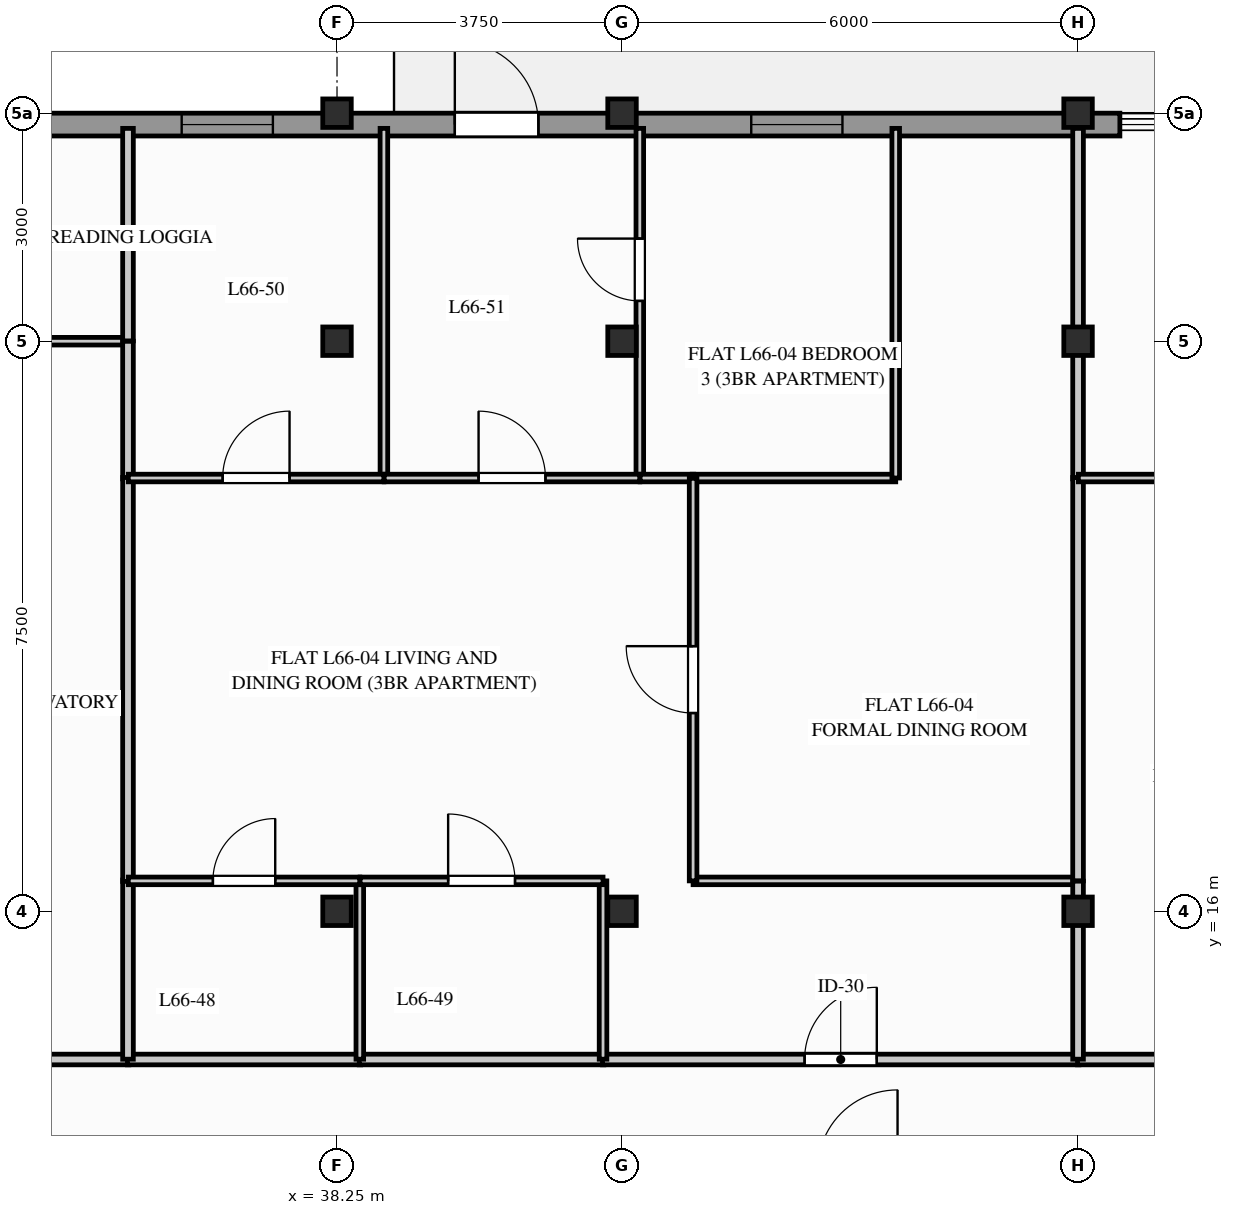
"""IFC4 building model, lengths in metres.
Left out: names, types, materials, properties, quantities, classifications, styles, units other than length and angle.
Written with IfcOpenShell. Run it as: python <this file> out.ifc"""

import sys

from ifc_helpers import new_model, si_unit, direction, frame, frame_2d, origin, origin_2d, place, context, subcontext, project, spatial, rectangle, i_section, extrude, element, fill, save


model = new_model("IFC4")
c1 = context("Model", 3, precision=1e-05, world=origin(), true_north=direction((0.0, 1.0)))
c2 = subcontext(c1, "Body", "Model", "MODEL_VIEW")
j1 = project(units=[si_unit("LENGTHUNIT", "METRE"), si_unit("PLANEANGLEUNIT", "RADIAN")], contexts=[c1])
p1 = place(None, origin())
s1 = spatial("IfcSite", under=j1, at=p1, CompositionType="ELEMENT")
p2 = place(p1, origin())
s2 = spatial("IfcBuilding", under=s1, at=p2, CompositionType="ELEMENT")
p3 = place(p2, frame((0.0, 0.0, 218.0)))
s3 = spatial("IfcBuildingStorey", under=s2, at=p3, CompositionType="ELEMENT", Elevation=218.0)
for number, where, z_axis, x_axis in (
    (1, (38.25, 16.0, 0.0), (0.0, 0.0, 1.0), (1.0, 0.0, 0.0)),
    (2, (38.25, 23.5, 0.0), (0.0, 0.0, 1.0), (1.0, 0.0, 0.0)),
    (3, (38.25, 26.5, 0.0), (0.0, 0.0, 1.0), (1.0, 0.0, 0.0)),
    (4, (42.0, 16.0, 0.0), (0.0, 0.0, 1.0), (1.0, 0.0, 0.0)),
    (5, (42.0, 23.5, 0.0), (0.0, 0.0, 1.0), (1.0, 0.0, 0.0)),
    (6, (42.0, 26.5, 0.0), (0.0, 0.0, 1.0), (1.0, 0.0, 0.0)),
    (7, (48.0, 16.0, 0.0), (0.0, 0.0, 1.0), (1.0, 0.0, 0.0)),
    (8, (48.0, 23.5, 0.0), (0.0, 0.0, 1.0), (1.0, 0.0, 0.0)),
    (9, (48.0, 26.5, 0.0), (0.0, 0.0, 1.0), (1.0, 0.0, 0.0)),
):
    element("IfcColumn", number, at=place(p3, frame(where, z_axis=z_axis, x_axis=x_axis)), inside=s3, PredefinedType="COLUMN", context=c2, shape_type="SweptSolid", body=[
        extrude(i_section(OverallWidth=0.375, OverallDepth=0.375, WebThickness=0.017, FlangeThickness=0.027, FilletRadius=0.015, at=origin_2d()), origin(), (0.0, 0.0, 1.0), 3.1),
    ])
p4 = place(p3, frame((32.2, 26.35, 0.0), z_axis=(0.0, 0.0, 1.0), x_axis=(1.0, 0.0, 0.0)))
e10 = element("IfcWall", 10, at=p4, inside=s3, PredefinedType="STANDARD", context=c2, shape_type="SweptSolid", body=[
    extrude(rectangle(XDim=16.35, YDim=0.3, at=frame_2d((8.175, 0.0))), origin(), (0.0, 0.0, 1.0), 2.332),
])
p5 = place(p4, frame((7.6, 0.0, 0.0)))
e11 = element("IfcOpeningElement", 11, at=p5, cuts=e10, PredefinedType="OPENING", context=c2, shape_type="SweptSolid", body=[
    extrude(rectangle(XDim=1.1, YDim=2.2, at=frame_2d((0.55, 1.1))), frame((0.0, 0.16, 0.0), z_axis=(0.0, -1.0, 0.0), x_axis=(1.0, 0.0, 0.0)), (0.0, 0.0, 1.0), 0.32),
])
p6 = place(p4, frame((11.5, 0.0, 0.512)))
e12 = element("IfcOpeningElement", 12, at=p6, cuts=e10, PredefinedType="OPENING", context=c2, shape_type="SweptSolid", body=[
    extrude(rectangle(XDim=1.2, YDim=1.6, at=frame_2d((0.6, 0.8))), frame((0.0, 0.16, 0.0), z_axis=(0.0, -1.0, 0.0), x_axis=(1.0, 0.0, 0.0)), (0.0, 0.0, 1.0), 0.32),
])
p7 = place(p4, frame((4.006, 0.0, 0.512)))
e13 = element("IfcOpeningElement", 13, at=p7, cuts=e10, PredefinedType="OPENING", context=c2, shape_type="SweptSolid", body=[
    extrude(rectangle(XDim=1.2, YDim=1.6, at=frame_2d((0.6, 0.8))), frame((0.0, 0.16, 0.0), z_axis=(0.0, -1.0, 0.0), x_axis=(1.0, 0.0, 0.0)), (0.0, 0.0, 1.0), 0.32),
])
p8 = place(p3, frame((24.493, 14.05, 0.0), z_axis=(0.0, 0.0, 1.0), x_axis=(1.0, 0.0, 0.0)))
e14 = element("IfcWall", 14, at=p8, inside=s3, PredefinedType="PARTITIONING", context=c2, shape_type="SweptSolid", body=[
    extrude(rectangle(XDim=11.019, YDim=0.14, at=frame_2d((5.509, 0.0))), origin(), (0.0, 0.0, 1.0), 2.332),
])
p9 = place(p8, frame((4.984, 0.0, 0.0)))
e15 = element("IfcOpeningElement", 15, at=p9, cuts=e14, PredefinedType="OPENING", context=c2, shape_type="SweptSolid", body=[
    extrude(rectangle(XDim=1.05, YDim=2.06, at=frame_2d((0.525, 1.03))), frame((0.0, 0.08, 0.0), z_axis=(0.0, -1.0, 0.0), x_axis=(1.0, 0.0, 0.0)), (0.0, 0.0, 1.0), 0.16),
])
p10 = place(p3, frame((35.493, 14.05, 0.0), z_axis=(0.0, 0.0, 1.0), x_axis=(1.0, 0.0, 0.0)))
e16 = element("IfcWall", 16, at=p10, inside=s3, PredefinedType="PARTITIONING", context=c2, shape_type="SweptSolid", body=[
    extrude(rectangle(XDim=3.069, YDim=0.14, at=frame_2d((1.534, 0.0))), origin(), (0.0, 0.0, 1.0), 2.325),
])
p11 = place(p3, frame((38.543, 14.05, 0.0), z_axis=(0.0, 0.0, 1.0), x_axis=(1.0, 0.0, 0.0)))
e17 = element("IfcWall", 17, at=p11, inside=s3, PredefinedType="PARTITIONING", context=c2, shape_type="SweptSolid", body=[
    extrude(rectangle(XDim=3.219, YDim=0.14, at=frame_2d((1.609, 0.0))), origin(), (0.0, 0.0, 1.0), 2.89),
])
p12 = place(p3, frame((41.743, 14.05, 0.0), z_axis=(0.0, 0.0, 1.0), x_axis=(1.0, 0.0, 0.0)))
e18 = element("IfcWall", 18, at=p12, inside=s3, PredefinedType="PARTITIONING", context=c2, shape_type="SweptSolid", body=[
    extrude(rectangle(XDim=6.269, YDim=0.14, at=frame_2d((3.134, 0.0))), origin(), (0.0, 0.0, 1.0), 2.325),
])
p13 = place(p12, frame((2.659, 0.0, 0.0)))
e19 = element("IfcOpeningElement", 19, at=p13, cuts=e18, PredefinedType="OPENING", context=c2, shape_type="SweptSolid", body=[
    extrude(rectangle(XDim=0.95, YDim=2.05, at=frame_2d((0.475, 1.025))), frame((0.0, 0.08, 0.0), z_axis=(0.0, -1.0, 0.0), x_axis=(1.0, 0.0, 0.0)), (0.0, 0.0, 1.0), 0.16),
])
p14 = place(p3, frame((47.993, 14.05, 0.0), z_axis=(0.0, 0.0, 1.0), x_axis=(1.0, 0.0, 0.0)))
e20 = element("IfcWall", 20, at=p14, inside=s3, PredefinedType="PARTITIONING", context=c2, shape_type="SweptSolid", body=[
    extrude(rectangle(XDim=5.565, YDim=0.14, at=frame_2d((2.782, 0.0))), origin(), (0.0, 0.0, 1.0), 2.325),
])
p15 = place(p14, frame((2.307, 0.0, 0.0)))
e21 = element("IfcOpeningElement", 21, at=p15, cuts=e20, PredefinedType="OPENING", context=c2, shape_type="SweptSolid", body=[
    extrude(rectangle(XDim=0.95, YDim=2.05, at=frame_2d((0.475, 1.025))), frame((0.0, 0.08, 0.0), z_axis=(0.0, -1.0, 0.0), x_axis=(1.0, 0.0, 0.0)), (0.0, 0.0, 1.0), 0.16),
])
p16 = place(p3, frame((24.504, 23.5, 0.0), z_axis=(0.0, 0.0, 1.0), x_axis=(1.0, 0.0, 0.0)))
e22 = element("IfcWall", 22, at=p16, inside=s3, PredefinedType="PARTITIONING", context=c2, shape_type="SweptSolid", body=[
    extrude(rectangle(XDim=10.996, YDim=0.1, at=frame_2d((5.498, 0.0))), origin(), (0.0, 0.0, 1.0), 2.325),
])
p17 = place(p16, frame((5.088, 0.0, 0.0)))
e23 = element("IfcOpeningElement", 23, at=p17, cuts=e22, PredefinedType="OPENING", context=c2, shape_type="SweptSolid", body=[
    extrude(rectangle(XDim=0.82, YDim=2.02, at=frame_2d((0.41, 1.01))), frame((0.0, 0.06, 0.0), z_axis=(0.0, -1.0, 0.0), x_axis=(1.0, 0.0, 0.0)), (0.0, 0.0, 1.0), 0.12),
])
p18 = place(p3, frame((35.5, 14.054, 0.0), z_axis=(0.0, 0.0, 1.0), x_axis=(0.0, 1.0, 0.0)))
e24 = element("IfcWall", 24, at=p18, inside=s3, PredefinedType="PARTITIONING", context=c2, shape_type="SweptSolid", body=[
    extrude(rectangle(XDim=2.357, YDim=0.14, at=frame_2d((1.179, 0.0))), origin(), (0.0, 0.0, 1.0), 2.325),
])
p19 = place(p3, frame((35.5, 21.689, 0.0), z_axis=(0.0, 0.0, 1.0), x_axis=(0.0, 1.0, 0.0)))
e25 = element("IfcWall", 25, at=p19, inside=s3, PredefinedType="PARTITIONING", context=c2, shape_type="SweptSolid", body=[
    extrude(rectangle(XDim=1.811, YDim=0.14, at=frame_2d((0.906, 0.0))), origin(), (0.0, 0.0, 1.0), 2.325),
])
p20 = place(p3, frame((35.5, 16.393, 0.0), z_axis=(0.0, 0.0, 1.0), x_axis=(0.0, 1.0, 0.0)))
e26 = element("IfcWall", 26, at=p20, inside=s3, PredefinedType="PARTITIONING", context=c2, shape_type="SweptSolid", body=[
    extrude(rectangle(XDim=5.315, YDim=0.14, at=frame_2d((2.657, 0.0))), origin(), (0.0, 0.0, 1.0), 2.614),
])
p21 = place(p3, frame((35.5, 23.504, 0.0), z_axis=(0.0, 0.0, 1.0), x_axis=(0.0, 1.0, 0.0)))
e27 = element("IfcWall", 27, at=p21, inside=s3, PredefinedType="PARTITIONING", context=c2, shape_type="SweptSolid", body=[
    extrude(rectangle(XDim=2.796, YDim=0.14, at=frame_2d((1.398, 0.0))), origin(), (0.0, 0.0, 1.0), 2.325),
])
p22 = place(p3, frame((38.55, 14.054, 0.0), z_axis=(0.0, 0.0, 1.0), x_axis=(0.0, 1.0, 0.0)))
e28 = element("IfcWall", 28, at=p22, inside=s3, PredefinedType="PARTITIONING", context=c2, shape_type="SweptSolid", body=[
    extrude(rectangle(XDim=2.346, YDim=0.1, at=frame_2d((1.173, 0.0))), origin(), (0.0, 0.0, 1.0), 2.325),
])
p23 = place(p3, frame((35.504, 16.4, 0.0), z_axis=(0.0, 0.0, 1.0), x_axis=(1.0, 0.0, 0.0)))
e29 = element("IfcWall", 29, at=p23, inside=s3, PredefinedType="PARTITIONING", context=c2, shape_type="SweptSolid", body=[
    extrude(rectangle(XDim=3.046, YDim=0.1, at=frame_2d((1.523, 0.0))), origin(), (0.0, 0.0, 1.0), 2.325),
])
p24 = place(p23, frame((1.113, 0.0, 0.0)))
e30 = element("IfcOpeningElement", 30, at=p24, cuts=e29, PredefinedType="OPENING", context=c2, shape_type="SweptSolid", body=[
    extrude(rectangle(XDim=0.82, YDim=2.02, at=frame_2d((0.41, 1.01))), frame((0.0, 0.06, 0.0), z_axis=(0.0, -1.0, 0.0), x_axis=(1.0, 0.0, 0.0)), (0.0, 0.0, 1.0), 0.12),
])
p25 = place(p3, frame((41.75, 14.054, 0.0), z_axis=(0.0, 0.0, 1.0), x_axis=(0.0, 1.0, 0.0)))
e31 = element("IfcWall", 31, at=p25, inside=s3, PredefinedType="PARTITIONING", context=c2, shape_type="SweptSolid", body=[
    extrude(rectangle(XDim=2.346, YDim=0.1, at=frame_2d((1.173, 0.0))), origin(), (0.0, 0.0, 1.0), 2.325),
])
p26 = place(p3, frame((38.554, 16.4, 0.0), z_axis=(0.0, 0.0, 1.0), x_axis=(1.0, 0.0, 0.0)))
e32 = element("IfcWall", 32, at=p26, inside=s3, PredefinedType="PARTITIONING", context=c2, shape_type="SweptSolid", body=[
    extrude(rectangle(XDim=3.196, YDim=0.1, at=frame_2d((1.598, 0.0))), origin(), (0.0, 0.0, 1.0), 2.89),
])
p27 = place(p26, frame((1.158, 0.0, 0.0)))
e33 = element("IfcOpeningElement", 33, at=p27, cuts=e32, PredefinedType="OPENING", context=c2, shape_type="SweptSolid", body=[
    extrude(rectangle(XDim=0.88, YDim=2.04, at=frame_2d((0.44, 1.02))), frame((0.0, 0.06, 0.0), z_axis=(0.0, -1.0, 0.0), x_axis=(1.0, 0.0, 0.0)), (0.0, 0.0, 1.0), 0.12),
])
p28 = place(p3, frame((38.867, 21.7, 0.0), z_axis=(0.0, 0.0, 1.0), x_axis=(0.0, 1.0, 0.0)))
e34 = element("IfcWall", 34, at=p28, inside=s3, PredefinedType="PARTITIONING", context=c2, shape_type="SweptSolid", body=[
    extrude(rectangle(XDim=4.6, YDim=0.1, at=frame_2d((2.3, 0.0))), origin(), (0.0, 0.0, 1.0), 2.325),
])
p29 = place(p3, frame((35.504, 21.7, 0.0), z_axis=(0.0, 0.0, 1.0), x_axis=(1.0, 0.0, 0.0)))
e35 = element("IfcWall", 35, at=p29, inside=s3, PredefinedType="PARTITIONING", context=c2, shape_type="SweptSolid", body=[
    extrude(rectangle(XDim=3.363, YDim=0.1, at=frame_2d((1.682, 0.0))), origin(), (0.0, 0.0, 1.0), 2.325),
])
p30 = place(p29, frame((1.241, 0.0, 0.0)))
e36 = element("IfcOpeningElement", 36, at=p30, cuts=e35, PredefinedType="OPENING", context=c2, shape_type="SweptSolid", body=[
    extrude(rectangle(XDim=0.88, YDim=2.04, at=frame_2d((0.44, 1.02))), frame((0.0, 0.06, 0.0), z_axis=(0.0, -1.0, 0.0), x_axis=(1.0, 0.0, 0.0)), (0.0, 0.0, 1.0), 0.12),
])
p31 = place(p3, frame((42.234, 21.7, 0.0), z_axis=(0.0, 0.0, 1.0), x_axis=(0.0, 1.0, 0.0)))
e37 = element("IfcWall", 37, at=p31, inside=s3, PredefinedType="PARTITIONING", context=c2, shape_type="SweptSolid", body=[
    extrude(rectangle(XDim=4.6, YDim=0.1, at=frame_2d((2.3, 0.0))), origin(), (0.0, 0.0, 1.0), 2.325),
])
p32 = place(p31, frame((2.33, 0.0, 0.0)))
e38 = element("IfcOpeningElement", 38, at=p32, cuts=e37, PredefinedType="OPENING", context=c2, shape_type="SweptSolid", body=[
    extrude(rectangle(XDim=0.82, YDim=2.02, at=frame_2d((0.41, 1.01))), frame((0.0, 0.06, 0.0), z_axis=(0.0, -1.0, 0.0), x_axis=(1.0, 0.0, 0.0)), (0.0, 0.0, 1.0), 0.12),
])
p33 = place(p3, frame((38.871, 21.7, 0.0), z_axis=(0.0, 0.0, 1.0), x_axis=(1.0, 0.0, 0.0)))
e39 = element("IfcWall", 39, at=p33, inside=s3, PredefinedType="PARTITIONING", context=c2, shape_type="SweptSolid", body=[
    extrude(rectangle(XDim=3.363, YDim=0.1, at=frame_2d((1.681, 0.0))), origin(), (0.0, 0.0, 1.0), 2.325),
])
p34 = place(p33, frame((1.241, 0.0, 0.0)))
e40 = element("IfcOpeningElement", 40, at=p34, cuts=e39, PredefinedType="OPENING", context=c2, shape_type="SweptSolid", body=[
    extrude(rectangle(XDim=0.88, YDim=2.04, at=frame_2d((0.44, 1.02))), frame((0.0, 0.06, 0.0), z_axis=(0.0, -1.0, 0.0), x_axis=(1.0, 0.0, 0.0)), (0.0, 0.0, 1.0), 0.12),
])
p35 = place(p3, frame((42.924, 21.7, 0.0), z_axis=(0.0, 0.0, 1.0), x_axis=(1.0, 0.0, 0.0)))
e41 = element("IfcWall", 41, at=p35, inside=s3, PredefinedType="PARTITIONING", context=c2, shape_type="SweptSolid", body=[
    extrude(rectangle(XDim=2.677, YDim=0.1, at=frame_2d((1.339, 0.0))), origin(), (0.0, 0.0, 1.0), 2.89),
])
p36 = place(p3, frame((45.601, 21.7, 0.0), z_axis=(0.0, 0.0, 1.0), x_axis=(0.0, 1.0, 0.0)))
e42 = element("IfcWall", 42, at=p36, inside=s3, PredefinedType="PARTITIONING", context=c2, shape_type="SweptSolid", body=[
    extrude(rectangle(XDim=4.6, YDim=0.1, at=frame_2d((2.3, 0.0))), origin(), (0.0, 0.0, 1.0), 2.325),
])
p37 = place(p3, frame((42.238, 21.7, 0.0), z_axis=(0.0, 0.0, 1.0), x_axis=(1.0, 0.0, 0.0)))
e43 = element("IfcWall", 43, at=p37, inside=s3, PredefinedType="PARTITIONING", context=c2, shape_type="SweptSolid", body=[
    extrude(rectangle(XDim=0.704, YDim=0.1, at=frame_2d((0.352, 0.0))), origin(), (0.0, 0.0, 1.0), 2.89),
])
p38 = place(p3, frame((42.935, 16.4, 0.0), z_axis=(0.0, 0.0, 1.0), x_axis=(1.0, 0.0, 0.0)))
e44 = element("IfcWall", 44, at=p38, inside=s3, PredefinedType="PARTITIONING", context=c2, shape_type="SweptSolid", body=[
    extrude(rectangle(XDim=5.065, YDim=0.1, at=frame_2d((2.532, 0.0))), origin(), (0.0, 0.0, 1.0), 2.325),
])
p39 = place(p3, frame((42.935, 16.4, 0.0), z_axis=(0.0, 0.0, 1.0), x_axis=(0.0, 1.0, 0.0)))
e45 = element("IfcWall", 45, at=p39, inside=s3, PredefinedType="PARTITIONING", context=c2, shape_type="SweptSolid", body=[
    extrude(rectangle(XDim=5.296, YDim=0.1, at=frame_2d((2.648, 0.0))), origin(), (0.0, 0.0, 1.0), 2.614),
])
p40 = place(p39, frame((2.208, 0.0, 0.0)))
e46 = element("IfcOpeningElement", 46, at=p40, cuts=e45, PredefinedType="OPENING", context=c2, shape_type="SweptSolid", body=[
    extrude(rectangle(XDim=0.88, YDim=2.04, at=frame_2d((0.44, 1.02))), frame((0.0, 0.06, 0.0), z_axis=(0.0, -1.0, 0.0), x_axis=(1.0, 0.0, 0.0)), (0.0, 0.0, 1.0), 0.12),
])
p41 = place(p3, frame((48.0, 21.689, 0.0), z_axis=(0.0, 0.0, 1.0), x_axis=(0.0, 1.0, 0.0)))
e47 = element("IfcWall", 47, at=p41, inside=s3, PredefinedType="PARTITIONING", context=c2, shape_type="SweptSolid", body=[
    extrude(rectangle(XDim=4.611, YDim=0.14, at=frame_2d((2.306, 0.0))), origin(), (0.0, 0.0, 1.0), 2.325),
])
p42 = place(p3, frame((48.0, 16.4, 0.0), z_axis=(0.0, 0.0, 1.0), x_axis=(0.0, 1.0, 0.0)))
e48 = element("IfcWall", 48, at=p42, inside=s3, PredefinedType="PARTITIONING", context=c2, shape_type="SweptSolid", body=[
    extrude(rectangle(XDim=5.307, YDim=0.14, at=frame_2d((2.654, 0.0))), origin(), (0.0, 0.0, 1.0), 2.325),
])
p43 = place(p3, frame((48.0, 14.054, 0.0), z_axis=(0.0, 0.0, 1.0), x_axis=(0.0, 1.0, 0.0)))
e49 = element("IfcWall", 49, at=p43, inside=s3, PredefinedType="PARTITIONING", context=c2, shape_type="SweptSolid", body=[
    extrude(rectangle(XDim=2.342, YDim=0.14, at=frame_2d((1.171, 0.0))), origin(), (0.0, 0.0, 1.0), 2.325),
])
p44 = place(p3, frame((48.004, 21.7, 0.0), z_axis=(0.0, 0.0, 1.0), x_axis=(1.0, 0.0, 0.0)))
e50 = element("IfcWall", 50, at=p44, inside=s3, PredefinedType="PARTITIONING", context=c2, shape_type="SweptSolid", body=[
    extrude(rectangle(XDim=3.471, YDim=0.1, at=frame_2d((1.736, 0.0))), origin(), (0.0, 0.0, 1.0), 2.325),
])
p45 = place(p44, frame((1.295, 0.0, 0.0)))
e51 = element("IfcOpeningElement", 51, at=p45, cuts=e50, PredefinedType="OPENING", context=c2, shape_type="SweptSolid", body=[
    extrude(rectangle(XDim=0.88, YDim=2.04, at=frame_2d((0.44, 1.02))), frame((0.0, 0.06, 0.0), z_axis=(0.0, -1.0, 0.0), x_axis=(1.0, 0.0, 0.0)), (0.0, 0.0, 1.0), 0.12),
])
p46 = place(p5, origin())
e52 = element("IfcDoor", 52, at=p46, inside=s3, OperationType="SINGLE_SWING_LEFT", PredefinedType="DOOR", context=c2, shape_type="SweptSolid", body=[
    extrude(rectangle(XDim=1.1, YDim=2.2, at=frame_2d((0.55, 1.1))), frame((0.0, 0.025, 0.0), z_axis=(0.0, -1.0, 0.0), x_axis=(1.0, 0.0, 0.0)), (0.0, 0.0, 1.0), 0.05),
])
fill(e11, e52)
p47 = place(p6, origin())
e53 = element("IfcWindow", 53, at=p47, inside=s3, PartitioningType="SINGLE_PANEL", PredefinedType="WINDOW", context=c2, shape_type="SweptSolid", body=[
    extrude(rectangle(XDim=1.2, YDim=1.6, at=frame_2d((0.6, 0.8))), frame((0.0, 0.03, 0.0), z_axis=(0.0, -1.0, 0.0), x_axis=(1.0, 0.0, 0.0)), (0.0, 0.0, 1.0), 0.06),
])
fill(e12, e53)
p48 = place(p13, origin())
e54 = element("IfcDoor", 54, at=p48, inside=s3, OperationType="SINGLE_SWING_RIGHT", PredefinedType="DOOR", context=c2, shape_type="SweptSolid", body=[
    extrude(rectangle(XDim=0.95, YDim=2.05, at=frame_2d((0.475, 1.025))), frame((0.0, 0.025, 0.0), z_axis=(0.0, -1.0, 0.0), x_axis=(1.0, 0.0, 0.0)), (0.0, 0.0, 1.0), 0.05),
])
fill(e19, e54)
p49 = place(p24, origin())
e55 = element("IfcDoor", 55, at=p49, inside=s3, OperationType="SINGLE_SWING_RIGHT", PredefinedType="DOOR", context=c2, shape_type="SweptSolid", body=[
    extrude(rectangle(XDim=0.82, YDim=2.02, at=frame_2d((0.41, 1.01))), frame((0.0, 0.025, 0.0), z_axis=(0.0, -1.0, 0.0), x_axis=(1.0, 0.0, 0.0)), (0.0, 0.0, 1.0), 0.05),
])
fill(e30, e55)
p50 = place(p27, origin())
e56 = element("IfcDoor", 56, at=p50, inside=s3, OperationType="SINGLE_SWING_LEFT", PredefinedType="DOOR", context=c2, shape_type="SweptSolid", body=[
    extrude(rectangle(XDim=0.88, YDim=2.04, at=frame_2d((0.44, 1.02))), frame((0.0, 0.025, 0.0), z_axis=(0.0, -1.0, 0.0), x_axis=(1.0, 0.0, 0.0)), (0.0, 0.0, 1.0), 0.05),
])
fill(e33, e56)
p51 = place(p30, origin())
e57 = element("IfcDoor", 57, at=p51, inside=s3, OperationType="SINGLE_SWING_RIGHT", PredefinedType="DOOR", context=c2, shape_type="SweptSolid", body=[
    extrude(rectangle(XDim=0.88, YDim=2.04, at=frame_2d((0.44, 1.02))), frame((0.0, 0.025, 0.0), z_axis=(0.0, -1.0, 0.0), x_axis=(1.0, 0.0, 0.0)), (0.0, 0.0, 1.0), 0.05),
])
fill(e36, e57)
p52 = place(p34, origin())
e58 = element("IfcDoor", 58, at=p52, inside=s3, OperationType="SINGLE_SWING_LEFT", PredefinedType="DOOR", context=c2, shape_type="SweptSolid", body=[
    extrude(rectangle(XDim=0.88, YDim=2.04, at=frame_2d((0.44, 1.02))), frame((0.0, 0.025, 0.0), z_axis=(0.0, -1.0, 0.0), x_axis=(1.0, 0.0, 0.0)), (0.0, 0.0, 1.0), 0.05),
])
fill(e40, e58)
p53 = place(p40, origin())
e59 = element("IfcDoor", 59, at=p53, inside=s3, OperationType="SINGLE_SWING_RIGHT", PredefinedType="DOOR", context=c2, shape_type="SweptSolid", body=[
    extrude(rectangle(XDim=0.88, YDim=2.04, at=frame_2d((0.44, 1.02))), frame((0.0, 0.025, 0.0), z_axis=(0.0, -1.0, 0.0), x_axis=(1.0, 0.0, 0.0)), (0.0, 0.0, 1.0), 0.05),
])
fill(e46, e59)
p54 = place(p32, origin())
e60 = element("IfcDoor", 60, at=p54, inside=s3, OperationType="SINGLE_SWING_RIGHT", PredefinedType="DOOR", context=c2, shape_type="SweptSolid", body=[
    extrude(rectangle(XDim=0.82, YDim=2.02, at=frame_2d((0.41, 1.01))), frame((0.0, 0.025, 0.0), z_axis=(0.0, -1.0, 0.0), x_axis=(1.0, 0.0, 0.0)), (0.0, 0.0, 1.0), 0.05),
])
fill(e38, e60)
p55 = place(p7, origin())
e61 = element("IfcWindow", 61, at=p55, inside=s3, PartitioningType="SINGLE_PANEL", PredefinedType="WINDOW", context=c2, shape_type="SweptSolid", body=[
    extrude(rectangle(XDim=1.2, YDim=1.6, at=frame_2d((0.6, 0.8))), frame((0.0, 0.03, 0.0), z_axis=(0.0, -1.0, 0.0), x_axis=(1.0, 0.0, 0.0)), (0.0, 0.0, 1.0), 0.06),
])
fill(e13, e61)
save(model, sys.argv[1])
